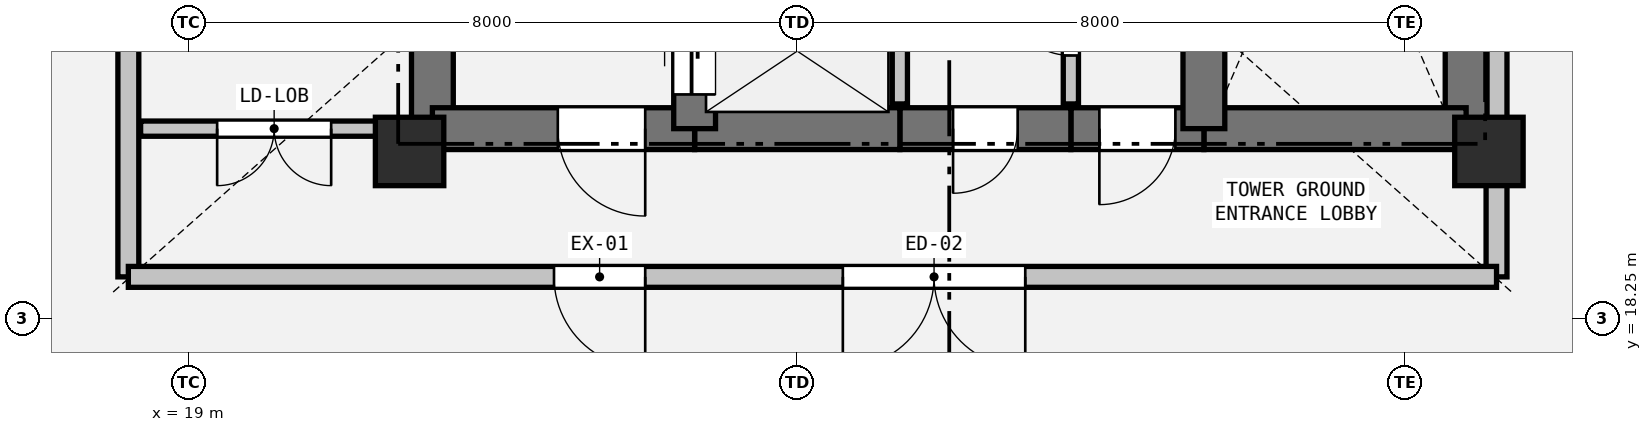
"""IFC4 building model, lengths in metres.
Left out: names, types, materials, properties, quantities, classifications, styles, units other than length and angle.
Written with IfcOpenShell. Run it as: python <this file> out.ifc"""

import sys

from ifc_helpers import new_model, si_unit, direction, frame, frame_2d, origin, origin_2d, place, context, subcontext, project, spatial, rectangle, extrude, element, fill, save


model = new_model("IFC4")
c1 = context("Model", 3, precision=1e-05, world=origin(), true_north=direction((0.0, 1.0)))
c2 = subcontext(c1, "Body", "Model", "MODEL_VIEW")
j1 = project(units=[si_unit("LENGTHUNIT", "METRE"), si_unit("PLANEANGLEUNIT", "RADIAN")], contexts=[c1])
p1 = place(None, origin())
s1 = spatial("IfcSite", under=j1, at=p1, CompositionType="ELEMENT")
p2 = place(p1, origin())
s2 = spatial("IfcBuilding", under=s1, at=p2, CompositionType="ELEMENT")
p3 = place(p2, origin())
s3 = spatial("IfcBuildingStorey", under=s2, at=p3, CompositionType="ELEMENT", Elevation=0.0)
for number, where, z_axis, x_axis in (
    (1, (21.9, 20.45, 0.0), (0.0, 0.0, 1.0), (1.0, 0.0, 0.0)),
    (2, (36.1, 20.45, 0.0), (0.0, 0.0, 1.0), (1.0, 0.0, 0.0)),
):
    element("IfcColumn", number, at=place(p3, frame(where, z_axis=z_axis, x_axis=x_axis)), inside=s3, PredefinedType="COLUMN", context=c2, shape_type="SweptSolid", body=[
        extrude(rectangle(XDim=0.9, YDim=0.9, at=origin_2d()), origin(), (0.0, 0.0, 1.0), 5.1),
    ])
p4 = place(p3, frame((18.2, 18.8, 0.0), z_axis=(0.0, 0.0, 1.0), x_axis=(0.0, 1.0, 0.0)))
e3 = element("IfcWall", 3, at=p4, inside=s3, PredefinedType="SOLIDWALL", context=c2, shape_type="SweptSolid", body=[
    extrude(rectangle(XDim=15.9, YDim=0.275, at=frame_2d((7.95, 0.0))), origin(), (0.0, 0.0, 1.0), 3.185),
])
p5 = place(p4, frame((10.5, 0.0, 0.0)))
e4 = element("IfcOpeningElement", 4, at=p5, cuts=e3, PredefinedType="OPENING", context=c2, shape_type="SweptSolid", body=[
    extrude(rectangle(XDim=1.2, YDim=2.2, at=frame_2d((0.6, 1.1))), frame((0.0, 0.147, 0.0), z_axis=(0.0, -1.0, 0.0), x_axis=(1.0, 0.0, 0.0)), (0.0, 0.0, 1.0), 0.295),
])
p6 = place(p3, frame((36.2, 34.7, 0.0), z_axis=(0.0, 0.0, 1.0), x_axis=(0.0, -1.0, 0.0)))
e5 = element("IfcWall", 5, at=p6, inside=s3, PredefinedType="SOLIDWALL", context=c2, shape_type="SweptSolid", body=[
    extrude(rectangle(XDim=15.9, YDim=0.275, at=frame_2d((7.95, 0.0))), origin(), (0.0, 0.0, 1.0), 3.185),
])
p7 = place(p3, frame((36.2, 18.8, 0.0), z_axis=(0.0, 0.0, 1.0), x_axis=(-1.0, 0.0, 0.0)))
e6 = element("IfcWall", 6, at=p7, inside=s3, PredefinedType="SOLIDWALL", context=c2, shape_type="SweptSolid", body=[
    extrude(rectangle(XDim=18.0, YDim=0.275, at=frame_2d((9.0, 0.0))), origin(), (0.0, 0.0, 1.0), 3.185),
])
p8 = place(p7, frame((6.2, 0.0, 0.0)))
e7 = element("IfcOpeningElement", 7, at=p8, cuts=e6, PredefinedType="OPENING", context=c2, shape_type="SweptSolid", body=[
    extrude(rectangle(XDim=2.4, YDim=2.4, at=frame_2d((1.2, 1.2))), frame((0.0, 0.147, 0.0), z_axis=(0.0, -1.0, 0.0), x_axis=(1.0, 0.0, 0.0)), (0.0, 0.0, 1.0), 0.295),
])
p9 = place(p7, frame((11.2, 0.0, 0.0)))
e8 = element("IfcOpeningElement", 8, at=p9, cuts=e6, PredefinedType="OPENING", context=c2, shape_type="SweptSolid", body=[
    extrude(rectangle(XDim=1.2, YDim=2.2, at=frame_2d((0.6, 1.1))), frame((0.0, 0.147, 0.0), z_axis=(0.0, -1.0, 0.0), x_axis=(1.0, 0.0, 0.0)), (0.0, 0.0, 1.0), 0.295),
])
p10 = place(p3, frame((22.2, 20.75, 0.0), z_axis=(0.0, 0.0, 1.0), x_axis=(0.0, 1.0, 0.0)))
e9 = element("IfcWall", 9, at=p10, inside=s3, PredefinedType="SHEAR", context=c2, shape_type="SweptSolid", body=[
    extrude(rectangle(XDim=4.65, YDim=0.55, at=frame_2d((2.325, 0.0))), origin(), (0.0, 0.0, 1.0), 4.8),
])
p11 = place(p3, frame((35.8, 28.1, 0.0), z_axis=(0.0, 0.0, 1.0), x_axis=(0.0, -1.0, 0.0)))
e10 = element("IfcWall", 10, at=p11, inside=s3, PredefinedType="SHEAR", context=c2, shape_type="SweptSolid", body=[
    extrude(rectangle(XDim=7.35, YDim=0.55, at=frame_2d((3.675, 0.0))), origin(), (0.0, 0.0, 1.0), 4.8),
])
p12 = place(p3, frame((35.8, 20.75, 0.0), z_axis=(0.0, 0.0, 1.0), x_axis=(-1.0, 0.0, 0.0)))
e11 = element("IfcWall", 11, at=p12, inside=s3, PredefinedType="SHEAR", context=c2, shape_type="SweptSolid", body=[
    extrude(rectangle(XDim=3.45, YDim=0.55, at=frame_2d((1.725, 0.0))), origin(), (0.0, 0.0, 1.0), 4.8),
])
p13 = place(p3, frame((32.35, 20.75, 0.0), z_axis=(0.0, 0.0, 1.0), x_axis=(-1.0, 0.0, 0.0)))
e12 = element("IfcWall", 12, at=p13, inside=s3, PredefinedType="SHEAR", context=c2, shape_type="SweptSolid", body=[
    extrude(rectangle(XDim=1.75, YDim=0.55, at=frame_2d((0.875, 0.0))), origin(), (0.0, 0.0, 1.0), 4.8),
])
p14 = place(p13, frame((0.375, 0.0, 0.0)))
e13 = element("IfcOpeningElement", 13, at=p14, cuts=e12, PredefinedType="OPENING", context=c2, shape_type="SweptSolid", body=[
    extrude(rectangle(XDim=1.0, YDim=2.15, at=frame_2d((0.5, 1.075))), frame((0.0, 0.285, 0.0), z_axis=(0.0, -1.0, 0.0), x_axis=(1.0, 0.0, 0.0)), (0.0, 0.0, 1.0), 0.57),
])
p15 = place(p3, frame((30.6, 20.75, 0.0), z_axis=(0.0, 0.0, 1.0), x_axis=(-1.0, 0.0, 0.0)))
e14 = element("IfcWall", 14, at=p15, inside=s3, PredefinedType="SHEAR", context=c2, shape_type="SweptSolid", body=[
    extrude(rectangle(XDim=2.25, YDim=0.55, at=frame_2d((1.125, 0.0))), origin(), (0.0, 0.0, 1.0), 4.8),
])
p16 = place(p15, frame((0.7, 0.0, 0.0)))
e15 = element("IfcOpeningElement", 15, at=p16, cuts=e14, PredefinedType="OPENING", context=c2, shape_type="SweptSolid", body=[
    extrude(rectangle(XDim=0.85, YDim=2.1, at=frame_2d((0.425, 1.05))), frame((0.0, 0.285, 0.0), z_axis=(0.0, -1.0, 0.0), x_axis=(1.0, 0.0, 0.0)), (0.0, 0.0, 1.0), 0.57),
])
p17 = place(p3, frame((28.35, 20.75, 0.0), z_axis=(0.0, 0.0, 1.0), x_axis=(-1.0, 0.0, 0.0)))
e16 = element("IfcWall", 16, at=p17, inside=s3, PredefinedType="SHEAR", context=c2, shape_type="SweptSolid", body=[
    extrude(rectangle(XDim=2.7, YDim=0.55, at=frame_2d((1.35, 0.0))), origin(), (0.0, 0.0, 1.0), 4.8),
])
p18 = place(p3, frame((25.65, 20.75, 0.0), z_axis=(0.0, 0.0, 1.0), x_axis=(-1.0, 0.0, 0.0)))
e17 = element("IfcWall", 17, at=p18, inside=s3, PredefinedType="SHEAR", context=c2, shape_type="SweptSolid", body=[
    extrude(rectangle(XDim=3.45, YDim=0.55, at=frame_2d((1.725, 0.0))), origin(), (0.0, 0.0, 1.0), 4.8),
])
p19 = place(p18, frame((0.65, 0.0, 0.0)))
e18 = element("IfcOpeningElement", 18, at=p19, cuts=e17, PredefinedType="OPENING", context=c2, shape_type="SweptSolid", body=[
    extrude(rectangle(XDim=1.15, YDim=2.15, at=frame_2d((0.575, 1.075))), frame((0.0, 0.285, 0.0), z_axis=(0.0, -1.0, 0.0), x_axis=(1.0, 0.0, 0.0)), (0.0, 0.0, 1.0), 0.57),
])
p20 = place(p3, frame((25.65, 20.75, 0.0), z_axis=(0.0, 0.0, 1.0), x_axis=(0.0, 1.0, 0.0)))
e19 = element("IfcWall", 19, at=p20, inside=s3, PredefinedType="SHEAR", context=c2, shape_type="SweptSolid", body=[
    extrude(rectangle(XDim=2.0, YDim=0.55, at=frame_2d((1.0, 0.0))), origin(), (0.0, 0.0, 1.0), 4.8),
])
p21 = place(p20, frame((0.45, 0.0, 0.0)))
e20 = element("IfcOpeningElement", 20, at=p21, cuts=e19, PredefinedType="OPENING", context=c2, shape_type="SweptSolid", body=[
    extrude(rectangle(XDim=1.1, YDim=2.15, at=frame_2d((0.55, 1.075))), frame((0.0, 0.285, 0.0), z_axis=(0.0, -1.0, 0.0), x_axis=(1.0, 0.0, 0.0)), (0.0, 0.0, 1.0), 0.57),
])
p22 = place(p3, frame((32.35, 20.75, 0.0), z_axis=(0.0, 0.0, 1.0), x_axis=(0.0, 1.0, 0.0)))
e21 = element("IfcWall", 21, at=p22, inside=s3, PredefinedType="SHEAR", context=c2, shape_type="SweptSolid", body=[
    extrude(rectangle(XDim=4.8, YDim=0.55, at=frame_2d((2.4, 0.0))), origin(), (0.0, 0.0, 1.0), 4.8),
])
p23 = place(p3, frame((28.35, 23.2, 0.0), z_axis=(0.0, 0.0, 1.0), x_axis=(0.0, -1.0, 0.0)))
e22 = element("IfcWall", 22, at=p23, inside=s3, PredefinedType="PARTITIONING", context=c2, shape_type="SweptSolid", body=[
    extrude(rectangle(XDim=2.125, YDim=0.2, at=frame_2d((1.062, 0.0))), origin(), (0.0, 0.0, 1.0), 4.8),
])
p24 = place(p3, frame((30.6, 21.075, 0.0), z_axis=(0.0, 0.0, 1.0), x_axis=(0.0, 1.0, 0.0)))
e23 = element("IfcWall", 23, at=p24, inside=s3, PredefinedType="PARTITIONING", context=c2, shape_type="SweptSolid", body=[
    extrude(rectangle(XDim=2.125, YDim=0.2, at=frame_2d((1.062, 0.0))), origin(), (0.0, 0.0, 1.0), 4.8),
])
p25 = place(p24, frame((0.637, 0.0, 0.0)))
e24 = element("IfcOpeningElement", 24, at=p25, cuts=e23, PredefinedType="OPENING", context=c2, shape_type="SweptSolid", body=[
    extrude(rectangle(XDim=0.85, YDim=2.1, at=frame_2d((0.425, 1.05))), frame((0.0, 0.11, 0.0), z_axis=(0.0, -1.0, 0.0), x_axis=(1.0, 0.0, 0.0)), (0.0, 0.0, 1.0), 0.22),
])
p26 = place(p3, frame((21.875, 20.75, 0.0), z_axis=(0.0, 0.0, 1.0), x_axis=(-1.0, 0.0, 0.0)))
e25 = element("IfcWall", 25, at=p26, inside=s3, PredefinedType="PARTITIONING", context=c2, shape_type="SweptSolid", body=[
    extrude(rectangle(XDim=3.513, YDim=0.2, at=frame_2d((1.757, 0.0))), origin(), (0.0, 0.0, 1.0), 4.8),
])
p27 = place(p26, frame((1.007, 0.0, 0.0)))
e26 = element("IfcOpeningElement", 26, at=p27, cuts=e25, PredefinedType="OPENING", context=c2, shape_type="SweptSolid", body=[
    extrude(rectangle(XDim=1.5, YDim=2.2, at=frame_2d((0.75, 1.1))), frame((0.0, 0.11, 0.0), z_axis=(0.0, -1.0, 0.0), x_axis=(1.0, 0.0, 0.0)), (0.0, 0.0, 1.0), 0.22),
])
p28 = place(p8, origin())
e27 = element("IfcDoor", 27, at=p28, inside=s3, OperationType="DOUBLE_DOOR_SINGLE_SWING", PredefinedType="DOOR", context=c2, shape_type="SweptSolid", body=[
    extrude(rectangle(XDim=2.4, YDim=2.4, at=frame_2d((1.2, 1.2))), frame((0.0, 0.025, 0.0), z_axis=(0.0, -1.0, 0.0), x_axis=(1.0, 0.0, 0.0)), (0.0, 0.0, 1.0), 0.05),
])
fill(e7, e27)
p29 = place(p9, origin())
e28 = element("IfcDoor", 28, at=p29, inside=s3, OperationType="SINGLE_SWING_LEFT", PredefinedType="DOOR", context=c2, shape_type="SweptSolid", body=[
    extrude(rectangle(XDim=1.2, YDim=2.2, at=frame_2d((0.6, 1.1))), frame((0.0, 0.025, 0.0), z_axis=(0.0, -1.0, 0.0), x_axis=(1.0, 0.0, 0.0)), (0.0, 0.0, 1.0), 0.05),
])
fill(e8, e28)
p30 = place(p14, origin())
e29 = element("IfcDoor", 29, at=p30, inside=s3, OperationType="SINGLE_SWING_RIGHT", PredefinedType="DOOR", context=c2, shape_type="SweptSolid", body=[
    extrude(rectangle(XDim=1.0, YDim=2.15, at=frame_2d((0.5, 1.075))), frame((0.0, 0.025, 0.0), z_axis=(0.0, -1.0, 0.0), x_axis=(1.0, 0.0, 0.0)), (0.0, 0.0, 1.0), 0.05),
])
fill(e13, e29)
p31 = place(p21, origin())
e30 = element("IfcDoor", 30, at=p31, inside=s3, OperationType="SLIDING_TO_LEFT", PredefinedType="DOOR", context=c2, shape_type="SweptSolid", body=[
    extrude(rectangle(XDim=1.1, YDim=2.15, at=frame_2d((0.55, 1.075))), frame((0.0, 0.025, 0.0), z_axis=(0.0, -1.0, 0.0), x_axis=(1.0, 0.0, 0.0)), (0.0, 0.0, 1.0), 0.05),
])
fill(e20, e30)
p32 = place(p19, origin())
e31 = element("IfcDoor", 31, at=p32, inside=s3, OperationType="SINGLE_SWING_LEFT", PredefinedType="DOOR", context=c2, shape_type="SweptSolid", body=[
    extrude(rectangle(XDim=1.15, YDim=2.15, at=frame_2d((0.575, 1.075))), frame((0.0, 0.025, 0.0), z_axis=(0.0, -1.0, 0.0), x_axis=(1.0, 0.0, 0.0)), (0.0, 0.0, 1.0), 0.05),
])
fill(e18, e31)
p33 = place(p25, origin())
e32 = element("IfcDoor", 32, at=p33, inside=s3, OperationType="SINGLE_SWING_RIGHT", PredefinedType="DOOR", context=c2, shape_type="SweptSolid", body=[
    extrude(rectangle(XDim=0.85, YDim=2.1, at=frame_2d((0.425, 1.05))), frame((0.0, 0.025, 0.0), z_axis=(0.0, -1.0, 0.0), x_axis=(1.0, 0.0, 0.0)), (0.0, 0.0, 1.0), 0.05),
])
fill(e24, e32)
p34 = place(p27, origin())
e33 = element("IfcDoor", 33, at=p34, inside=s3, OperationType="DOUBLE_DOOR_SINGLE_SWING", PredefinedType="DOOR", context=c2, shape_type="SweptSolid", body=[
    extrude(rectangle(XDim=1.5, YDim=2.2, at=frame_2d((0.75, 1.1))), frame((0.0, 0.025, 0.0), z_axis=(0.0, -1.0, 0.0), x_axis=(1.0, 0.0, 0.0)), (0.0, 0.0, 1.0), 0.05),
])
fill(e26, e33)
p35 = place(p16, origin())
e34 = element("IfcDoor", 34, at=p35, inside=s3, OperationType="SINGLE_SWING_RIGHT", PredefinedType="DOOR", context=c2, shape_type="SweptSolid", body=[
    extrude(rectangle(XDim=0.85, YDim=2.1, at=frame_2d((0.425, 1.05))), frame((0.0, 0.025, 0.0), z_axis=(0.0, -1.0, 0.0), x_axis=(1.0, 0.0, 0.0)), (0.0, 0.0, 1.0), 0.05),
])
fill(e15, e34)
save(model, sys.argv[1])
